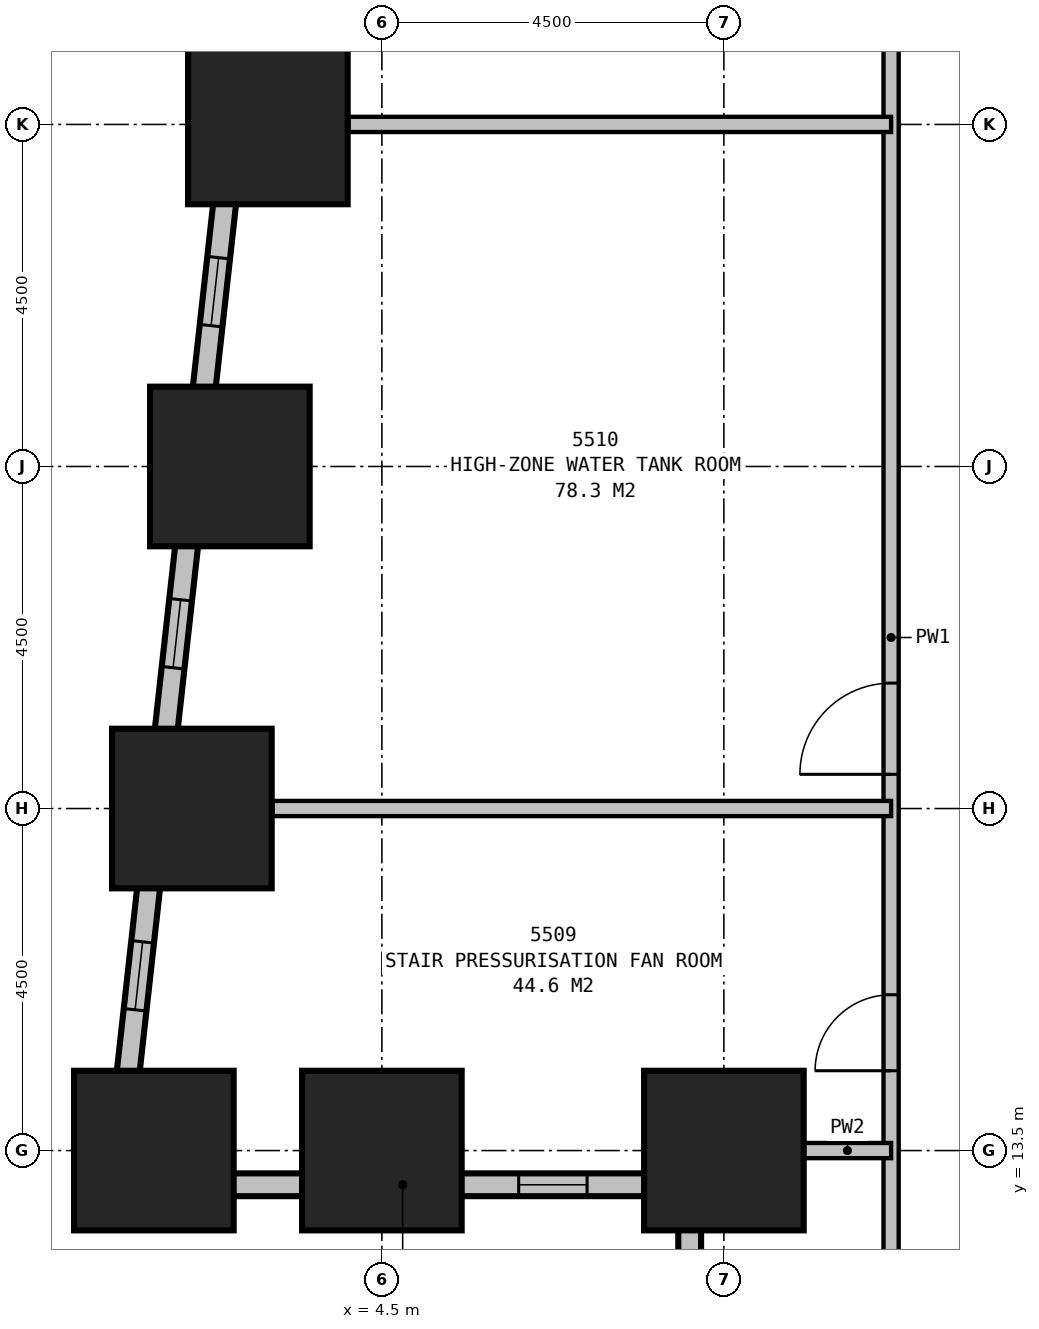
"""IFC4 building model, lengths in metres.
Left out: names, types, materials, properties, quantities, classifications, styles, units other than length and angle.
Written with IfcOpenShell. Run it as: python <this file> out.ifc"""

import sys

from ifc_helpers import new_model, si_unit, direction, frame, frame_2d, origin, origin_2d, place, context, subcontext, project, spatial, rectangle, extrude, element, fill, save


model = new_model("IFC4")
c1 = context("Model", 3, precision=1e-05, world=origin(), true_north=direction((0.0, 1.0)))
c2 = subcontext(c1, "Body", "Model", "MODEL_VIEW")
j1 = project(units=[si_unit("LENGTHUNIT", "METRE"), si_unit("PLANEANGLEUNIT", "RADIAN")], contexts=[c1])
p1 = place(None, origin())
s1 = spatial("IfcSite", under=j1, at=p1, CompositionType="ELEMENT")
p2 = place(p1, origin())
s2 = spatial("IfcBuilding", under=s1, at=p2, CompositionType="ELEMENT")
p3 = place(p2, frame((0.0, 0.0, 211.4)))
s3 = spatial("IfcBuildingStorey", under=s2, at=p3, CompositionType="ELEMENT", Elevation=211.4)
for number, where, z_axis, x_axis in (
    (1, (1.5, 13.5, 0.0), (0.0, 0.0, 1.0), (1.0, 0.0, 0.0)),
    (2, (4.5, 13.5, 0.0), (0.0, 0.0, 1.0), (1.0, 0.0, 0.0)),
    (3, (9.0, 13.5, 0.0), (0.0, 0.0, 1.0), (1.0, 0.0, 0.0)),
    (4, (3.0, 27.0, 0.0), (0.0, 0.0, 1.0), (1.0, 0.0, 0.0)),
    (5, (2.5, 22.5, 0.0), (0.0, 0.0, 1.0), (1.0, 0.0, 0.0)),
    (6, (2.0, 18.0, 0.0), (0.0, 0.0, 1.0), (1.0, 0.0, 0.0)),
):
    element("IfcColumn", number, at=place(p3, frame(where, z_axis=z_axis, x_axis=x_axis)), inside=s3, PredefinedType="COLUMN", context=c2, shape_type="SweptSolid", body=[
        extrude(rectangle(XDim=2.1, YDim=2.1, at=origin_2d()), origin(), (0.0, 0.0, 1.0), 6.0),
    ])
p4 = place(p3, frame((0.847, 13.05, 0.0), z_axis=(0.0, 0.0, 1.0), x_axis=(1.0, 0.0, 0.0)))
e7 = element("IfcWall", 7, at=p4, inside=s3, PredefinedType="STANDARD", context=c2, shape_type="SweptSolid", body=[
    extrude(rectangle(XDim=7.853, YDim=0.3, at=frame_2d((3.926, 0.0))), origin(), (0.0, 0.0, 1.0), 2.15),
])
p5 = place(p4, frame((5.453, 0.0, 0.5)))
e8 = element("IfcOpeningElement", 8, at=p5, cuts=e7, PredefinedType="OPENING", context=c2, shape_type="SweptSolid", body=[
    extrude(rectangle(XDim=0.9, YDim=1.2, at=frame_2d((0.45, 0.6))), frame((0.0, 0.16, 0.0), z_axis=(0.0, -1.0, 0.0), x_axis=(1.0, 0.0, 0.0)), (0.0, 0.0, 1.0), 0.32),
])
p6 = place(p3, frame((8.55, 13.2, 0.0), z_axis=(0.0, 0.0, 1.0), x_axis=(0.0, -1.0, 0.0)))
e9 = element("IfcWall", 9, at=p6, inside=s3, PredefinedType="STANDARD", context=c2, shape_type="SweptSolid", body=[
    extrude(rectangle(XDim=13.8, YDim=0.3, at=frame_2d((6.9, 0.0))), origin(), (0.0, 0.0, 1.0), 4.6),
])
p7 = place(p6, frame((1.5, 0.0, 0.5)))
e10 = element("IfcOpeningElement", 10, at=p7, cuts=e9, PredefinedType="OPENING", context=c2, shape_type="SweptSolid", body=[
    extrude(rectangle(XDim=0.9, YDim=1.2, at=frame_2d((0.45, 0.6))), frame((0.0, 0.16, 0.0), z_axis=(0.0, -1.0, 0.0), x_axis=(1.0, 0.0, 0.0)), (0.0, 0.0, 1.0), 0.32),
])
p8 = place(p6, frame((6.0, 0.0, 0.5)))
e11 = element("IfcOpeningElement", 11, at=p8, cuts=e9, PredefinedType="OPENING", context=c2, shape_type="SweptSolid", body=[
    extrude(rectangle(XDim=0.9, YDim=1.2, at=frame_2d((0.45, 0.6))), frame((0.0, 0.16, 0.0), z_axis=(0.0, -1.0, 0.0), x_axis=(1.0, 0.0, 0.0)), (0.0, 0.0, 1.0), 0.32),
])
p9 = place(p6, frame((10.5, 0.0, 0.5)))
e12 = element("IfcOpeningElement", 12, at=p9, cuts=e9, PredefinedType="OPENING", context=c2, shape_type="SweptSolid", body=[
    extrude(rectangle(XDim=0.9, YDim=1.2, at=frame_2d((0.45, 0.6))), frame((0.0, 0.16, 0.0), z_axis=(0.0, -1.0, 0.0), x_axis=(1.0, 0.0, 0.0)), (0.0, 0.0, 1.0), 0.32),
])
p10 = place(p3, frame((3.614, 36.599, 0.0), z_axis=(0.0, 0.0, 1.0), x_axis=(-0.11042815468, -0.993884109267, 0.0)))
e13 = element("IfcWall", 13, at=p10, inside=s3, PredefinedType="STANDARD", context=c2, shape_type="SweptSolid", body=[
    extrude(rectangle(XDim=23.844, YDim=0.3, at=frame_2d((11.922, 0.0))), origin(), (0.0, 0.0, 1.0), 4.6),
])
p11 = place(p10, frame((2.367, 0.0, 0.5)))
e14 = element("IfcOpeningElement", 14, at=p11, cuts=e13, PredefinedType="OPENING", context=c2, shape_type="SweptSolid", body=[
    extrude(rectangle(XDim=0.9, YDim=1.2, at=frame_2d((0.45, 0.6))), frame((0.0, 0.16, 0.0), z_axis=(0.0, -1.0, 0.0), x_axis=(1.0, 0.0, 0.0)), (0.0, 0.0, 1.0), 0.32),
])
p12 = place(p10, frame((6.895, 0.0, 0.5)))
e15 = element("IfcOpeningElement", 15, at=p12, cuts=e13, PredefinedType="OPENING", context=c2, shape_type="SweptSolid", body=[
    extrude(rectangle(XDim=0.9, YDim=1.2, at=frame_2d((0.45, 0.6))), frame((0.0, 0.16, 0.0), z_axis=(0.0, -1.0, 0.0), x_axis=(1.0, 0.0, 0.0)), (0.0, 0.0, 1.0), 0.32),
])
p13 = place(p10, frame((11.422, 0.0, 0.5)))
e16 = element("IfcOpeningElement", 16, at=p13, cuts=e13, PredefinedType="OPENING", context=c2, shape_type="SweptSolid", body=[
    extrude(rectangle(XDim=0.9, YDim=1.2, at=frame_2d((0.45, 0.6))), frame((0.0, 0.16, 0.0), z_axis=(0.0, -1.0, 0.0), x_axis=(1.0, 0.0, 0.0)), (0.0, 0.0, 1.0), 0.32),
])
p14 = place(p10, frame((15.95, 0.0, 0.5)))
e17 = element("IfcOpeningElement", 17, at=p14, cuts=e13, PredefinedType="OPENING", context=c2, shape_type="SweptSolid", body=[
    extrude(rectangle(XDim=0.9, YDim=1.2, at=frame_2d((0.45, 0.6))), frame((0.0, 0.16, 0.0), z_axis=(0.0, -1.0, 0.0), x_axis=(1.0, 0.0, 0.0)), (0.0, 0.0, 1.0), 0.32),
])
p15 = place(p10, frame((20.478, 0.0, 0.5)))
e18 = element("IfcOpeningElement", 18, at=p15, cuts=e13, PredefinedType="OPENING", context=c2, shape_type="SweptSolid", body=[
    extrude(rectangle(XDim=0.9, YDim=1.2, at=frame_2d((0.45, 0.6))), frame((0.0, 0.16, 0.0), z_axis=(0.0, -1.0, 0.0), x_axis=(1.0, 0.0, 0.0)), (0.0, 0.0, 1.0), 0.32),
])
p16 = place(p3, frame((11.2, 11.2, 0.0), z_axis=(0.0, 0.0, 1.0), x_axis=(0.0, 1.0, 0.0)))
e19 = element("IfcWall", 19, at=p16, inside=s3, PredefinedType="PARTITIONING", context=c2, shape_type="SweptSolid", body=[
    extrude(rectangle(XDim=18.1, YDim=0.2, at=frame_2d((9.05, 0.0))), origin(), (0.0, 0.0, 1.0), 5.75),
])
p17 = place(p16, frame((3.35, 0.0, 0.0)))
e20 = element("IfcOpeningElement", 20, at=p17, cuts=e19, PredefinedType="OPENING", context=c2, shape_type="SweptSolid", body=[
    extrude(rectangle(XDim=1.0, YDim=2.1, at=frame_2d((0.5, 1.05))), frame((0.0, 0.11, 0.0), z_axis=(0.0, -1.0, 0.0), x_axis=(1.0, 0.0, 0.0)), (0.0, 0.0, 1.0), 0.22),
])
p18 = place(p16, frame((7.25, 0.0, 0.0)))
e21 = element("IfcOpeningElement", 21, at=p18, cuts=e19, PredefinedType="OPENING", context=c2, shape_type="SweptSolid", body=[
    extrude(rectangle(XDim=1.2, YDim=2.1, at=frame_2d((0.6, 1.05))), frame((0.0, 0.11, 0.0), z_axis=(0.0, -1.0, 0.0), x_axis=(1.0, 0.0, 0.0)), (0.0, 0.0, 1.0), 0.22),
])
p19 = place(p3, frame((11.2, 13.5, 0.0), z_axis=(0.0, 0.0, 1.0), x_axis=(-1.0, 0.0, 0.0)))
e22 = element("IfcWall", 22, at=p19, inside=s3, PredefinedType="PARTITIONING", context=c2, shape_type="SweptSolid", body=[
    extrude(rectangle(XDim=1.15, YDim=0.2, at=frame_2d((0.575, 0.0))), origin(), (0.0, 0.0, 1.0), 2.15),
])
p20 = place(p3, frame((11.2, 18.0, 0.0), z_axis=(0.0, 0.0, 1.0), x_axis=(-1.0, 0.0, 0.0)))
e23 = element("IfcWall", 23, at=p20, inside=s3, PredefinedType="PARTITIONING", context=c2, shape_type="SweptSolid", body=[
    extrude(rectangle(XDim=8.139, YDim=0.2, at=frame_2d((4.07, 0.0))), origin(), (0.0, 0.0, 1.0), 2.15),
])
p21 = place(p3, frame((11.2, 27.0, 0.0), z_axis=(0.0, 0.0, 1.0), x_axis=(-1.0, 0.0, 0.0)))
e24 = element("IfcWall", 24, at=p21, inside=s3, PredefinedType="PARTITIONING", context=c2, shape_type="SweptSolid", body=[
    extrude(rectangle(XDim=7.139, YDim=0.2, at=frame_2d((3.57, 0.0))), origin(), (0.0, 0.0, 1.0), 1.55),
])
p22 = place(p5, origin())
e25 = element("IfcWindow", 25, at=p22, inside=s3, PartitioningType="SINGLE_PANEL", PredefinedType="USERDEFINED", context=c2, shape_type="SweptSolid", body=[
    extrude(rectangle(XDim=0.9, YDim=1.2, at=frame_2d((0.45, 0.6))), frame((0.0, 0.03, 0.0), z_axis=(0.0, -1.0, 0.0), x_axis=(1.0, 0.0, 0.0)), (0.0, 0.0, 1.0), 0.06),
])
fill(e8, e25)
p23 = place(p13, origin())
e26 = element("IfcWindow", 26, at=p23, inside=s3, PartitioningType="SINGLE_PANEL", PredefinedType="USERDEFINED", context=c2, shape_type="SweptSolid", body=[
    extrude(rectangle(XDim=0.9, YDim=1.2, at=frame_2d((0.45, 0.6))), frame((0.0, 0.03, 0.0), z_axis=(0.0, -1.0, 0.0), x_axis=(1.0, 0.0, 0.0)), (0.0, 0.0, 1.0), 0.06),
])
fill(e16, e26)
p24 = place(p14, origin())
e27 = element("IfcWindow", 27, at=p24, inside=s3, PartitioningType="SINGLE_PANEL", PredefinedType="USERDEFINED", context=c2, shape_type="SweptSolid", body=[
    extrude(rectangle(XDim=0.9, YDim=1.2, at=frame_2d((0.45, 0.6))), frame((0.0, 0.03, 0.0), z_axis=(0.0, -1.0, 0.0), x_axis=(1.0, 0.0, 0.0)), (0.0, 0.0, 1.0), 0.06),
])
fill(e17, e27)
p25 = place(p15, origin())
e28 = element("IfcWindow", 28, at=p25, inside=s3, PartitioningType="SINGLE_PANEL", PredefinedType="USERDEFINED", context=c2, shape_type="SweptSolid", body=[
    extrude(rectangle(XDim=0.9, YDim=1.2, at=frame_2d((0.45, 0.6))), frame((0.0, 0.03, 0.0), z_axis=(0.0, -1.0, 0.0), x_axis=(1.0, 0.0, 0.0)), (0.0, 0.0, 1.0), 0.06),
])
fill(e18, e28)
p26 = place(p17, origin())
e29 = element("IfcDoor", 29, at=p26, inside=s3, OperationType="SINGLE_SWING_LEFT", PredefinedType="DOOR", context=c2, shape_type="SweptSolid", body=[
    extrude(rectangle(XDim=1.0, YDim=2.1, at=frame_2d((0.5, 1.05))), frame((0.0, 0.025, 0.0), z_axis=(0.0, -1.0, 0.0), x_axis=(1.0, 0.0, 0.0)), (0.0, 0.0, 1.0), 0.05),
])
fill(e20, e29)
p27 = place(p18, origin())
e30 = element("IfcDoor", 30, at=p27, inside=s3, OperationType="SINGLE_SWING_LEFT", PredefinedType="DOOR", context=c2, shape_type="SweptSolid", body=[
    extrude(rectangle(XDim=1.2, YDim=2.1, at=frame_2d((0.6, 1.05))), frame((0.0, 0.025, 0.0), z_axis=(0.0, -1.0, 0.0), x_axis=(1.0, 0.0, 0.0)), (0.0, 0.0, 1.0), 0.05),
])
fill(e21, e30)
save(model, sys.argv[1])
